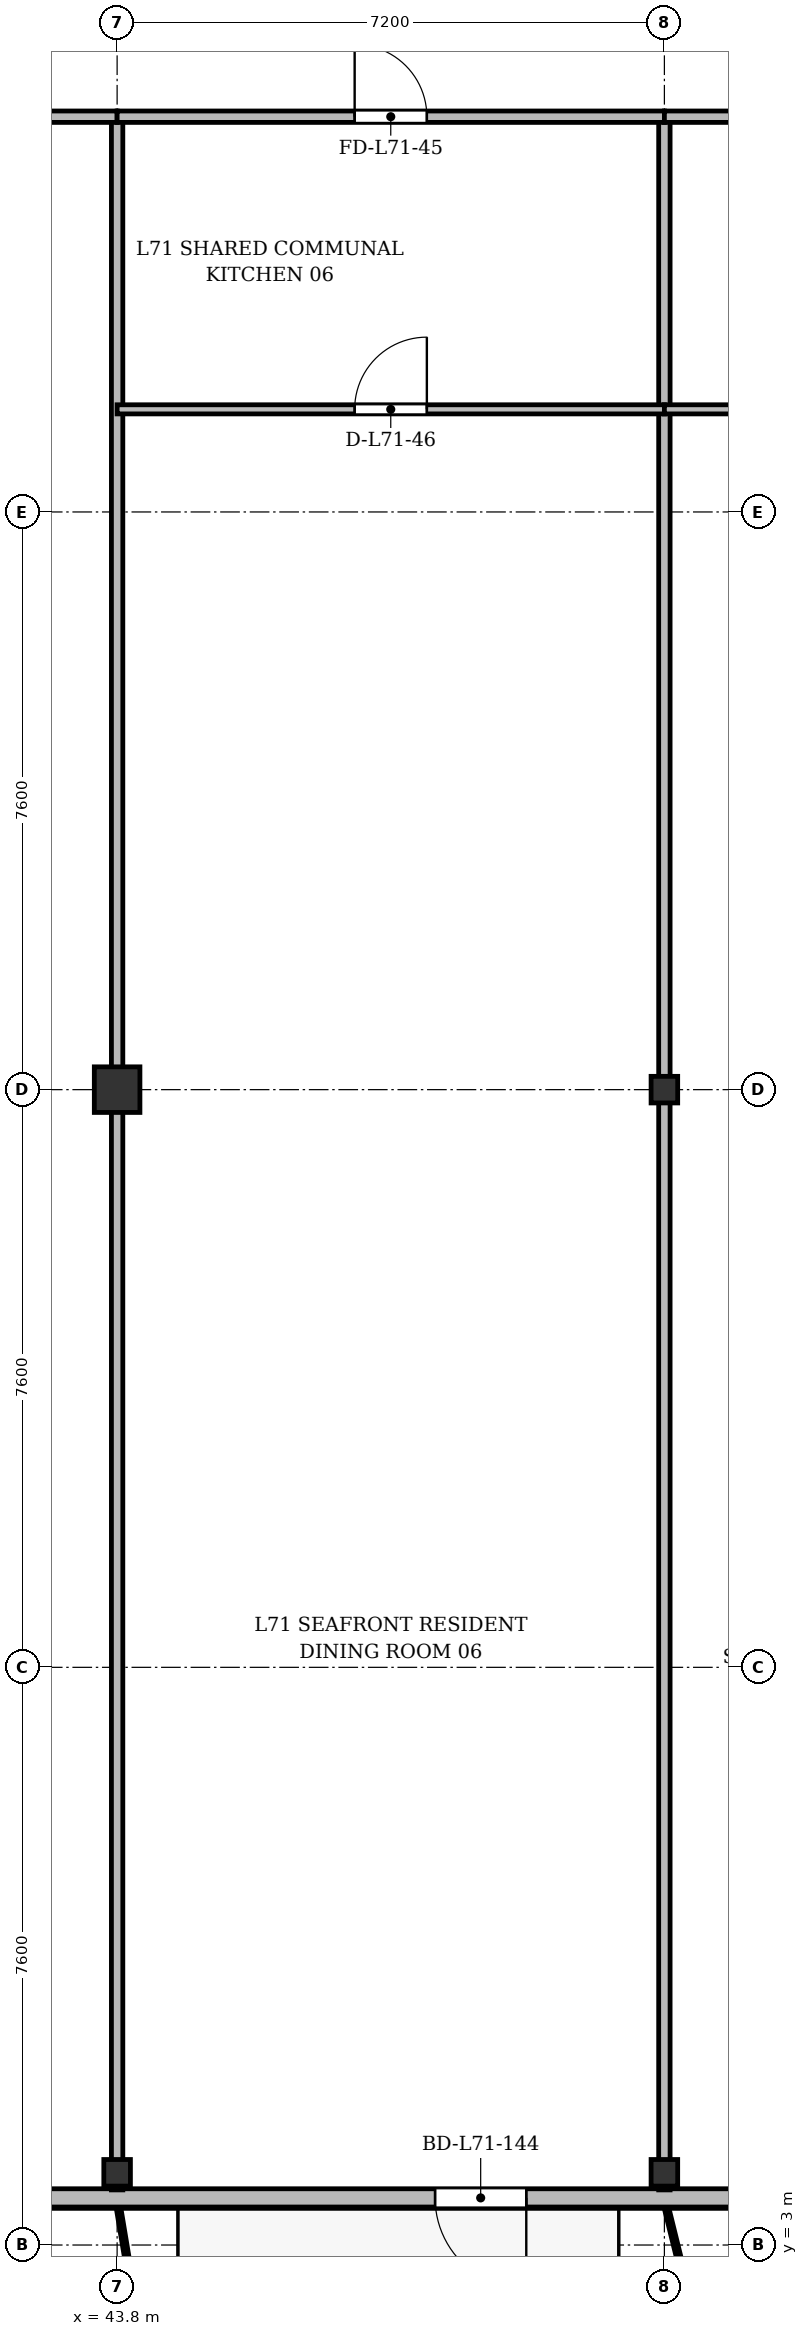
"""IFC4 building model, lengths in metres.
Left out: names, types, materials, properties, quantities, classifications, styles, units other than length and angle.
Written with IfcOpenShell. Run it as: python <this file> out.ifc"""

import sys

from ifc_helpers import new_model, si_unit, direction, frame, frame_2d, origin, origin_2d, place, context, subcontext, project, spatial, rectangle, i_section, extrude, source, transform, mapped, element, fill, save


model = new_model("IFC4")
c1 = context("Model", 3, precision=1e-05, world=origin(), true_north=direction((0.0, 1.0)))
c2 = subcontext(c1, "Body", "Model", "MODEL_VIEW")
j1 = project(units=[si_unit("LENGTHUNIT", "METRE"), si_unit("PLANEANGLEUNIT", "RADIAN")], contexts=[c1])
p1 = place(None, origin())
s1 = spatial("IfcSite", under=j1, at=p1, CompositionType="ELEMENT")
p2 = place(p1, origin())
s2 = spatial("IfcBuilding", under=s1, at=p2, CompositionType="ELEMENT")
p3 = place(p2, frame((0.0, 0.0, 273.9)))
s3 = spatial("IfcBuildingStorey", under=s2, at=p3, CompositionType="ELEMENT", Elevation=273.9)
m1 = source(origin(), c2, "Body", "SweptSolid", [
    extrude(i_section(OverallWidth=0.35, OverallDepth=0.35, WebThickness=0.018, FlangeThickness=0.028, at=origin_2d()), origin(), (0.0, 0.0, 1.0), 3.6),
])
p4 = place(p3, frame((43.8, 3.95, 0.0), z_axis=(0.0, 0.0, 1.0), x_axis=(1.0, 0.0, 0.0)))
e1 = element("IfcColumn", 1, at=p4, inside=s3, PredefinedType="COLUMN", context=c2, shape_type="MappedRepresentation", body=[
    mapped(m1, transform((0.0, 0.0, 0.0), x_axis=(1.0, 0.0, 0.0), y_axis=(0.0, 1.0, 0.0), z_axis=(0.0, 0.0, 1.0), scale=1.0)),
])
m2 = source(origin(), c2, "Body", "SweptSolid", [
    extrude(rectangle(XDim=0.6, YDim=0.6, at=origin_2d()), origin(), (0.0, 0.0, 1.0), 3.6),
])
p5 = place(p3, frame((43.8, 18.2, 0.0), z_axis=(0.0, 0.0, 1.0), x_axis=(1.0, 0.0, 0.0)))
e2 = element("IfcColumn", 2, at=p5, inside=s3, PredefinedType="COLUMN", context=c2, shape_type="MappedRepresentation", body=[
    mapped(m2, transform((0.0, 0.0, 0.0), x_axis=(1.0, 0.0, 0.0), y_axis=(0.0, 1.0, 0.0), z_axis=(0.0, 0.0, 1.0), scale=1.0)),
])
for number, where, z_axis, x_axis in (
    (3, (51.0, 3.95, 0.0), (0.0, 0.0, 1.0), (1.0, 0.0, 0.0)),
    (4, (51.0, 18.2, 0.0), (0.0, 0.0, 1.0), (1.0, 0.0, 0.0)),
):
    element("IfcColumn", number, at=place(p3, frame(where, z_axis=z_axis, x_axis=x_axis)), inside=s3, PredefinedType="COLUMN", context=c2, shape_type="MappedRepresentation", body=[
        mapped(m1, transform((0.0, 0.0, 0.0), x_axis=(1.0, 0.0, 0.0), y_axis=(0.0, 1.0, 0.0), z_axis=(0.0, 0.0, 1.0), scale=1.0)),
    ])
p6 = place(p3, frame((63.2, 3.62, 0.0), z_axis=(0.0, 0.0, 1.0), x_axis=(-1.0, 0.0, 0.0)))
e5 = element("IfcWall", 5, at=p6, inside=s3, PredefinedType="SOLIDWALL", context=c2, shape_type="SweptSolid", body=[
    extrude(rectangle(XDim=52.0, YDim=0.24, at=frame_2d((26.0, 0.0))), origin(), (0.0, 0.0, 1.0), 3.37),
])
p7 = place(p6, frame((1.145, 0.0, 0.9)))
e6 = element("IfcOpeningElement", 6, at=p7, cuts=e5, PredefinedType="OPENING", context=c2, shape_type="SweptSolid", body=[
    extrude(rectangle(XDim=2.2, YDim=1.8, at=frame_2d((1.1, 0.9))), frame((0.0, 0.13, 0.0), z_axis=(0.0, -1.0, 0.0), x_axis=(1.0, 0.0, 0.0)), (0.0, 0.0, 1.0), 0.26),
])
p8 = place(p6, frame((5.45, 0.0, 0.9)))
e7 = element("IfcOpeningElement", 7, at=p8, cuts=e5, PredefinedType="OPENING", context=c2, shape_type="SweptSolid", body=[
    extrude(rectangle(XDim=1.5, YDim=1.75, at=frame_2d((0.75, 0.875))), frame((0.0, 0.13, 0.0), z_axis=(0.0, -1.0, 0.0), x_axis=(1.0, 0.0, 0.0)), (0.0, 0.0, 1.0), 0.26),
])
p9 = place(p6, frame((9.1, 0.0, 0.9)))
e8 = element("IfcOpeningElement", 8, at=p9, cuts=e5, PredefinedType="OPENING", context=c2, shape_type="SweptSolid", body=[
    extrude(rectangle(XDim=2.0, YDim=1.95, at=frame_2d((1.0, 0.975))), frame((0.0, 0.13, 0.0), z_axis=(0.0, -1.0, 0.0), x_axis=(1.0, 0.0, 0.0)), (0.0, 0.0, 1.0), 0.26),
])
p10 = place(p6, frame((14.017, 0.0, 0.0)))
e9 = element("IfcOpeningElement", 9, at=p10, cuts=e5, PredefinedType="OPENING", context=c2, shape_type="SweptSolid", body=[
    extrude(rectangle(XDim=1.2, YDim=2.2, at=frame_2d((0.6, 1.1))), frame((0.0, 0.13, 0.0), z_axis=(0.0, -1.0, 0.0), x_axis=(1.0, 0.0, 0.0)), (0.0, 0.0, 1.0), 0.26),
])
p11 = place(p6, frame((25.1, 0.0, 0.9)))
e10 = element("IfcOpeningElement", 10, at=p11, cuts=e5, PredefinedType="OPENING", context=c2, shape_type="SweptSolid", body=[
    extrude(rectangle(XDim=1.8, YDim=1.8, at=frame_2d((0.9, 0.9))), frame((0.0, 0.13, 0.0), z_axis=(0.0, -1.0, 0.0), x_axis=(1.0, 0.0, 0.0)), (0.0, 0.0, 1.0), 0.26),
])
p12 = place(p6, frame((33.05, 0.0, 0.9)))
e11 = element("IfcOpeningElement", 11, at=p12, cuts=e5, PredefinedType="OPENING", context=c2, shape_type="SweptSolid", body=[
    extrude(rectangle(XDim=1.5, YDim=1.75, at=frame_2d((0.75, 0.875))), frame((0.0, 0.13, 0.0), z_axis=(0.0, -1.0, 0.0), x_axis=(1.0, 0.0, 0.0)), (0.0, 0.0, 1.0), 0.26),
])
p13 = place(p6, frame((35.45, 0.0, 0.9)))
e12 = element("IfcOpeningElement", 12, at=p13, cuts=e5, PredefinedType="OPENING", context=c2, shape_type="SweptSolid", body=[
    extrude(rectangle(XDim=1.5, YDim=1.75, at=frame_2d((0.75, 0.875))), frame((0.0, 0.13, 0.0), z_axis=(0.0, -1.0, 0.0), x_axis=(1.0, 0.0, 0.0)), (0.0, 0.0, 1.0), 0.26),
])
p14 = place(p6, frame((37.85, 0.0, 0.9)))
e13 = element("IfcOpeningElement", 13, at=p14, cuts=e5, PredefinedType="OPENING", context=c2, shape_type="SweptSolid", body=[
    extrude(rectangle(XDim=1.5, YDim=1.75, at=frame_2d((0.75, 0.875))), frame((0.0, 0.13, 0.0), z_axis=(0.0, -1.0, 0.0), x_axis=(1.0, 0.0, 0.0)), (0.0, 0.0, 1.0), 0.26),
])
p15 = place(p6, frame((41.452, 0.0, 0.0)))
e14 = element("IfcOpeningElement", 14, at=p15, cuts=e5, PredefinedType="OPENING", context=c2, shape_type="SweptSolid", body=[
    extrude(rectangle(XDim=1.2, YDim=2.2, at=frame_2d((0.6, 1.1))), frame((0.0, 0.13, 0.0), z_axis=(0.0, -1.0, 0.0), x_axis=(1.0, 0.0, 0.0)), (0.0, 0.0, 1.0), 0.26),
])
p16 = place(p6, frame((44.5, 0.0, 0.9)))
e15 = element("IfcOpeningElement", 15, at=p16, cuts=e5, PredefinedType="OPENING", context=c2, shape_type="SweptSolid", body=[
    extrude(rectangle(XDim=1.8, YDim=1.8, at=frame_2d((0.9, 0.9))), frame((0.0, 0.13, 0.0), z_axis=(0.0, -1.0, 0.0), x_axis=(1.0, 0.0, 0.0)), (0.0, 0.0, 1.0), 0.26),
])
p17 = place(p6, frame((48.655, 0.0, 0.9)))
e16 = element("IfcOpeningElement", 16, at=p17, cuts=e5, PredefinedType="OPENING", context=c2, shape_type="SweptSolid", body=[
    extrude(rectangle(XDim=2.2, YDim=1.8, at=frame_2d((1.1, 0.9))), frame((0.0, 0.13, 0.0), z_axis=(0.0, -1.0, 0.0), x_axis=(1.0, 0.0, 0.0)), (0.0, 0.0, 1.0), 0.26),
])
for number, where, z_axis, x_axis in (
    (17, (43.8, 3.725, 0.0), (0.0, 0.0, 1.0), (0.0, 1.0, 0.0)),
    (18, (51.0, 3.725, 0.0), (0.0, 0.0, 1.0), (0.0, 1.0, 0.0)),
):
    element("IfcWall", number, at=place(p3, frame(where, z_axis=z_axis, x_axis=x_axis)), inside=s3, PredefinedType="PARTITIONING", context=c2, shape_type="SweptSolid", body=[
        extrude(rectangle(XDim=27.275, YDim=0.15, at=frame_2d((13.637, 0.0))), origin(), (0.0, 0.0, 1.0), 2.87),
    ])
p18 = place(p3, frame((30.6, 31.0, 0.0), z_axis=(0.0, 0.0, 1.0), x_axis=(1.0, 0.0, 0.0)))
e19 = element("IfcWall", 19, at=p18, inside=s3, PredefinedType="PARTITIONING", context=c2, shape_type="SweptSolid", body=[
    extrude(rectangle(XDim=13.2, YDim=0.15, at=frame_2d((6.6, 0.0))), origin(), (0.0, 0.0, 1.0), 2.87),
])
p19 = place(p18, frame((5.8, 0.0, 0.0)))
e20 = element("IfcOpeningElement", 20, at=p19, cuts=e19, PredefinedType="OPENING", context=c2, shape_type="SweptSolid", body=[
    extrude(rectangle(XDim=1.6, YDim=2.2, at=frame_2d((0.8, 1.1))), frame((0.0, 0.085, 0.0), z_axis=(0.0, -1.0, 0.0), x_axis=(1.0, 0.0, 0.0)), (0.0, 0.0, 1.0), 0.17),
])
p20 = place(p3, frame((43.8, 31.0, 0.0), z_axis=(0.0, 0.0, 1.0), x_axis=(1.0, 0.0, 0.0)))
e21 = element("IfcWall", 21, at=p20, inside=s3, PredefinedType="PARTITIONING", context=c2, shape_type="SweptSolid", body=[
    extrude(rectangle(XDim=7.2, YDim=0.15, at=frame_2d((3.6, 0.0))), origin(), (0.0, 0.0, 1.0), 2.87),
])
p21 = place(p20, frame((3.125, 0.0, 0.0)))
e22 = element("IfcOpeningElement", 22, at=p21, cuts=e21, PredefinedType="OPENING", context=c2, shape_type="SweptSolid", body=[
    extrude(rectangle(XDim=0.95, YDim=2.15, at=frame_2d((0.475, 1.075))), frame((0.0, 0.085, 0.0), z_axis=(0.0, -1.0, 0.0), x_axis=(1.0, 0.0, 0.0)), (0.0, 0.0, 1.0), 0.17),
])
p22 = place(p3, frame((43.8, 27.15, 0.0), z_axis=(0.0, 0.0, 1.0), x_axis=(1.0, 0.0, 0.0)))
e23 = element("IfcWall", 23, at=p22, inside=s3, PredefinedType="PARTITIONING", context=c2, shape_type="SweptSolid", body=[
    extrude(rectangle(XDim=7.2, YDim=0.12, at=frame_2d((3.6, 0.0))), origin(), (0.0, 0.0, 1.0), 2.87),
])
p23 = place(p22, frame((3.125, 0.0, 0.0)))
e24 = element("IfcOpeningElement", 24, at=p23, cuts=e23, PredefinedType="OPENING", context=c2, shape_type="SweptSolid", body=[
    extrude(rectangle(XDim=0.95, YDim=2.15, at=frame_2d((0.475, 1.075))), frame((0.0, 0.07, 0.0), z_axis=(0.0, -1.0, 0.0), x_axis=(1.0, 0.0, 0.0)), (0.0, 0.0, 1.0), 0.14),
])
p24 = place(p3, frame((51.0, 31.0, 0.0), z_axis=(0.0, 0.0, 1.0), x_axis=(1.0, 0.0, 0.0)))
e25 = element("IfcWall", 25, at=p24, inside=s3, PredefinedType="PARTITIONING", context=c2, shape_type="SweptSolid", body=[
    extrude(rectangle(XDim=4.2, YDim=0.15, at=frame_2d((2.1, 0.0))), origin(), (0.0, 0.0, 1.0), 2.87),
])
p25 = place(p24, frame((1.529, 0.0, 0.0)))
e26 = element("IfcOpeningElement", 26, at=p25, cuts=e25, PredefinedType="OPENING", context=c2, shape_type="SweptSolid", body=[
    extrude(rectangle(XDim=0.95, YDim=2.15, at=frame_2d((0.475, 1.075))), frame((0.0, 0.085, 0.0), z_axis=(0.0, -1.0, 0.0), x_axis=(1.0, 0.0, 0.0)), (0.0, 0.0, 1.0), 0.17),
])
p26 = place(p3, frame((51.0, 27.15, 0.0), z_axis=(0.0, 0.0, 1.0), x_axis=(1.0, 0.0, 0.0)))
e27 = element("IfcWall", 27, at=p26, inside=s3, PredefinedType="PARTITIONING", context=c2, shape_type="SweptSolid", body=[
    extrude(rectangle(XDim=4.2, YDim=0.12, at=frame_2d((2.1, 0.0))), origin(), (0.0, 0.0, 1.0), 2.87),
])
p27 = place(p26, frame((1.529, 0.0, 0.0)))
e28 = element("IfcOpeningElement", 28, at=p27, cuts=e27, PredefinedType="OPENING", context=c2, shape_type="SweptSolid", body=[
    extrude(rectangle(XDim=0.95, YDim=2.15, at=frame_2d((0.475, 1.075))), frame((0.0, 0.07, 0.0), z_axis=(0.0, -1.0, 0.0), x_axis=(1.0, 0.0, 0.0)), (0.0, 0.0, 1.0), 0.14),
])
m3 = source(origin(), c2, "Body", "SweptSolid", [
    extrude(rectangle(XDim=1.2, YDim=2.2, at=frame_2d((0.6, 1.1))), frame((0.0, 0.025, 0.0), z_axis=(0.0, -1.0, 0.0), x_axis=(1.0, 0.0, 0.0)), (0.0, 0.0, 1.0), 0.05),
])
p28 = place(p10, origin())
e29 = element("IfcDoor", 29, at=p28, inside=s3, OperationType="SINGLE_SWING_LEFT", PredefinedType="DOOR", context=c2, shape_type="MappedRepresentation", body=[
    mapped(m3, transform((0.0, 0.0, 0.0), x_axis=(1.0, 0.0, 0.0), y_axis=(0.0, 1.0, 0.0), z_axis=(0.0, 0.0, 1.0), scale=1.0)),
])
fill(e9, e29)
m4 = source(origin(), c2, "Body", "SweptSolid", [
    extrude(rectangle(XDim=0.95, YDim=2.15, at=frame_2d((0.475, 1.075))), frame((0.0, 0.025, 0.0), z_axis=(0.0, -1.0, 0.0), x_axis=(1.0, 0.0, 0.0)), (0.0, 0.0, 1.0), 0.05),
])
p29 = place(p21, origin())
e30 = element("IfcDoor", 30, at=p29, inside=s3, OperationType="SINGLE_SWING_LEFT", PredefinedType="DOOR", context=c2, shape_type="MappedRepresentation", body=[
    mapped(m4, transform((0.0, 0.0, 0.0), x_axis=(1.0, 0.0, 0.0), y_axis=(0.0, 1.0, 0.0), z_axis=(0.0, 0.0, 1.0), scale=1.0)),
])
fill(e22, e30)
p30 = place(p23, origin())
e31 = element("IfcDoor", 31, at=p30, inside=s3, OperationType="SINGLE_SWING_RIGHT", PredefinedType="DOOR", context=c2, shape_type="MappedRepresentation", body=[
    mapped(m4, transform((0.0, 0.0, 0.0), x_axis=(1.0, 0.0, 0.0), y_axis=(0.0, 1.0, 0.0), z_axis=(0.0, 0.0, 1.0), scale=1.0)),
])
fill(e24, e31)
save(model, sys.argv[1])
